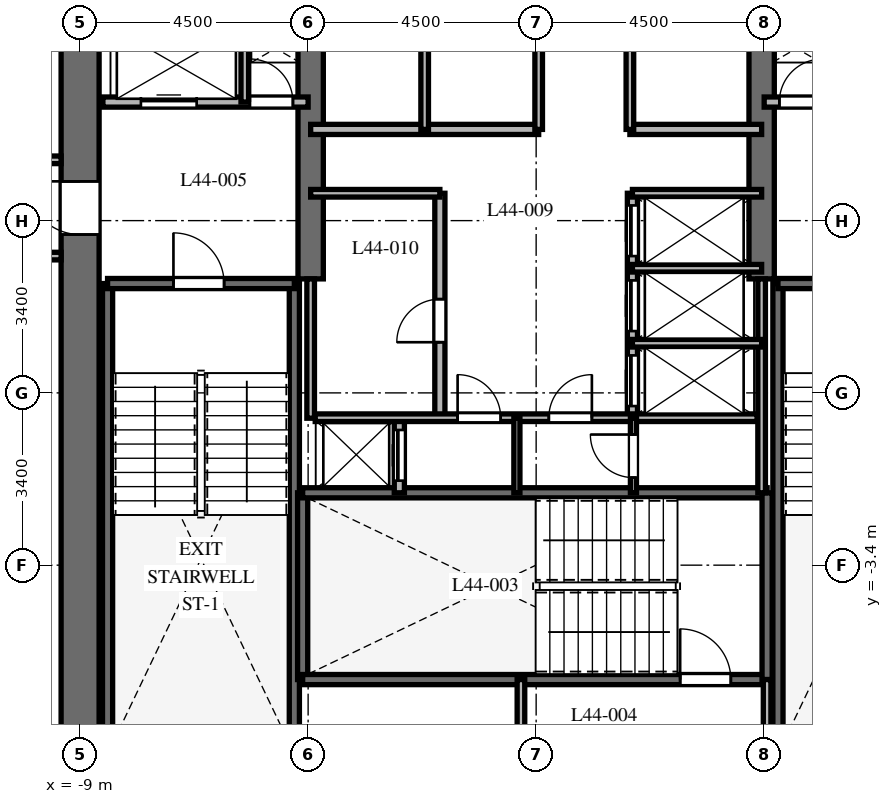
"""IFC4 building model, lengths in metres.
Left out: names, types, materials, properties, quantities, classifications, styles, units other than length and angle.
Written with IfcOpenShell. Run it as: python <this file> out.ifc"""

import sys

from ifc_helpers import new_model, si_unit, direction, frame, frame_2d, origin, place, context, subcontext, project, spatial, rectangle, extrude, element, fill, save


model = new_model("IFC4")
c1 = context("Model", 3, precision=1e-05, world=origin(), true_north=direction((0.0, 1.0)))
c2 = subcontext(c1, "Body", "Model", "MODEL_VIEW")
j1 = project(units=[si_unit("LENGTHUNIT", "METRE"), si_unit("PLANEANGLEUNIT", "RADIAN")], contexts=[c1])
p1 = place(None, origin())
s1 = spatial("IfcSite", under=j1, at=p1, CompositionType="ELEMENT")
p2 = place(p1, origin())
s2 = spatial("IfcBuilding", under=s1, at=p2, CompositionType="ELEMENT")
p3 = place(p2, frame((0.0, 0.0, 179.3)))
s3 = spatial("IfcBuildingStorey", under=s2, at=p3, CompositionType="ELEMENT", Elevation=179.3)
p4 = place(p3, frame((-9.0, -7.125, 0.0), z_axis=(0.0, 0.0, 1.0), x_axis=(0.0, 1.0, 0.0)))
e1 = element("IfcWall", 1, at=p4, inside=s3, PredefinedType="SHEAR", context=c2, shape_type="SweptSolid", body=[
    extrude(rectangle(XDim=14.25, YDim=0.75, at=frame_2d((7.125, 0.0))), origin(), (0.0, 0.0, 1.0), 3.7),
])
p5 = place(p4, frame((10.25, 0.0, 0.0)))
e2 = element("IfcOpeningElement", 2, at=p5, cuts=e1, PredefinedType="OPENING", context=c2, shape_type="SweptSolid", body=[
    extrude(rectangle(XDim=1.05, YDim=2.15, at=frame_2d((0.525, 1.075))), frame((0.0, 0.385, 0.0), z_axis=(0.0, -1.0, 0.0), x_axis=(1.0, 0.0, 0.0)), (0.0, 0.0, 1.0), 0.77),
])
for number, where, z_axis, x_axis in (
    (3, (-4.45, 2.25, 0.0), (0.0, 0.0, 1.0), (0.0, 1.0, 0.0)),
    (4, (4.45, 2.25, 0.0), (0.0, 0.0, 1.0), (0.0, 1.0, 0.0)),
):
    element("IfcWall", number, at=place(p3, frame(where, z_axis=z_axis, x_axis=x_axis)), inside=s3, PredefinedType="SHEAR", context=c2, shape_type="SweptSolid", body=[
        extrude(rectangle(XDim=4.875, YDim=0.5, at=frame_2d((2.438, 0.0))), origin(), (0.0, 0.0, 1.0), 3.7),
    ])
for number, where, z_axis, x_axis in (
    (5, (-8.458, -6.985, 0.0), (0.0, 0.0, 1.0), (0.0, 1.0, 0.0)),
    (6, (-4.772, -6.985, 0.0), (0.0, 0.0, 1.0), (0.0, 1.0, 0.0)),
):
    element("IfcWall", number, at=place(p3, frame(where, z_axis=z_axis, x_axis=x_axis)), inside=s3, PredefinedType="SHEAR", context=c2, shape_type="SweptSolid", body=[
        extrude(rectangle(XDim=9.143, YDim=0.2, at=frame_2d((4.572, 0.0))), origin(), (0.0, 0.0, 1.0), 3.7),
    ])
p6 = place(p3, frame((-8.458, 2.158, 0.0), z_axis=(0.0, 0.0, 1.0), x_axis=(1.0, 0.0, 0.0)))
e7 = element("IfcWall", 7, at=p6, inside=s3, PredefinedType="SHEAR", context=c2, shape_type="SweptSolid", body=[
    extrude(rectangle(XDim=3.686, YDim=0.2, at=frame_2d((1.843, 0.0))), origin(), (0.0, 0.0, 1.0), 3.7),
])
p7 = place(p6, frame((1.3, 0.0, 0.0)))
e8 = element("IfcOpeningElement", 8, at=p7, cuts=e7, PredefinedType="OPENING", context=c2, shape_type="SweptSolid", body=[
    extrude(rectangle(XDim=1.0, YDim=2.15, at=frame_2d((0.5, 1.075))), frame((0.0, 0.11, 0.0), z_axis=(0.0, -1.0, 0.0), x_axis=(1.0, 0.0, 0.0)), (0.0, 0.0, 1.0), 0.22),
])
p8 = place(p3, frame((4.772, -6.985, 0.0), z_axis=(0.0, 0.0, 1.0), x_axis=(0.0, 1.0, 0.0)))
e9 = element("IfcWall", 9, at=p8, inside=s3, PredefinedType="SHEAR", context=c2, shape_type="SweptSolid", body=[
    extrude(rectangle(XDim=9.143, YDim=0.2, at=frame_2d((4.572, 0.0))), origin(), (0.0, 0.0, 1.0), 3.7),
])
p9 = place(p3, frame((4.772, 2.158, 0.0), z_axis=(0.0, 0.0, 1.0), x_axis=(1.0, 0.0, 0.0)))
e10 = element("IfcWall", 10, at=p9, inside=s3, PredefinedType="SHEAR", context=c2, shape_type="SweptSolid", body=[
    extrude(rectangle(XDim=3.686, YDim=0.2, at=frame_2d((1.843, 0.0))), origin(), (0.0, 0.0, 1.0), 3.7),
])
p10 = place(p9, frame((1.35, 0.0, 0.0)))
e11 = element("IfcOpeningElement", 11, at=p10, cuts=e10, PredefinedType="OPENING", context=c2, shape_type="SweptSolid", body=[
    extrude(rectangle(XDim=1.0, YDim=2.15, at=frame_2d((0.5, 1.075))), frame((0.0, 0.11, 0.0), z_axis=(0.0, -1.0, 0.0), x_axis=(1.0, 0.0, 0.0)), (0.0, 0.0, 1.0), 0.22),
])
p11 = place(p3, frame((-4.608, -5.658, 0.0), z_axis=(0.0, 0.0, 1.0), x_axis=(0.0, 1.0, 0.0)))
e12 = element("IfcWall", 12, at=p11, inside=s3, PredefinedType="SHEAR", context=c2, shape_type="SweptSolid", body=[
    extrude(rectangle(XDim=3.686, YDim=0.2, at=frame_2d((1.843, 0.0))), origin(), (0.0, 0.0, 1.0), 3.7),
])
p12 = place(p3, frame((-4.608, -5.658, 0.0), z_axis=(0.0, 0.0, 1.0), x_axis=(1.0, 0.0, 0.0)))
e13 = element("IfcWall", 13, at=p12, inside=s3, PredefinedType="SHEAR", context=c2, shape_type="SweptSolid", body=[
    extrude(rectangle(XDim=9.166, YDim=0.2, at=frame_2d((4.583, 0.0))), origin(), (0.0, 0.0, 1.0), 3.7),
])
p13 = place(p12, frame((7.45, 0.0, 0.0)))
e14 = element("IfcOpeningElement", 14, at=p13, cuts=e13, PredefinedType="OPENING", context=c2, shape_type="SweptSolid", body=[
    extrude(rectangle(XDim=1.0, YDim=2.15, at=frame_2d((0.5, 1.075))), frame((0.0, 0.11, 0.0), z_axis=(0.0, -1.0, 0.0), x_axis=(1.0, 0.0, 0.0)), (0.0, 0.0, 1.0), 0.22),
])
p14 = place(p3, frame((-4.608, -1.972, 0.0), z_axis=(0.0, 0.0, 1.0), x_axis=(1.0, 0.0, 0.0)))
e15 = element("IfcWall", 15, at=p14, inside=s3, PredefinedType="SHEAR", context=c2, shape_type="SweptSolid", body=[
    extrude(rectangle(XDim=9.166, YDim=0.2, at=frame_2d((4.583, 0.0))), origin(), (0.0, 0.0, 1.0), 3.7),
])
p15 = place(p3, frame((4.558, -5.658, 0.0), z_axis=(0.0, 0.0, 1.0), x_axis=(0.0, 1.0, 0.0)))
e16 = element("IfcWall", 16, at=p15, inside=s3, PredefinedType="SHEAR", context=c2, shape_type="SweptSolid", body=[
    extrude(rectangle(XDim=3.686, YDim=0.2, at=frame_2d((1.843, 0.0))), origin(), (0.0, 0.0, 1.0), 3.7),
])
for number, where, z_axis, x_axis in (
    (17, (-0.3, -7.02, 0.0), (0.0, 0.0, 1.0), (0.0, 1.0, 0.0)),
    (18, (4.558, -7.02, 0.0), (0.0, 0.0, 1.0), (0.0, 1.0, 0.0)),
):
    element("IfcWall", number, at=place(p3, frame(where, z_axis=z_axis, x_axis=x_axis)), inside=s3, PredefinedType="PARTITIONING", context=c2, shape_type="SweptSolid", body=[
        extrude(rectangle(XDim=1.362, YDim=0.15, at=frame_2d((0.681, 0.0))), origin(), (0.0, 0.0, 1.0), 3.4),
    ])
p16 = place(p3, frame((-8.55, 5.74, 0.0), z_axis=(0.0, 0.0, 1.0), x_axis=(1.0, 0.0, 0.0)))
e19 = element("IfcWall", 19, at=p16, inside=s3, PredefinedType="PARTITIONING", context=c2, shape_type="SweptSolid", body=[
    extrude(rectangle(XDim=4.05, YDim=0.2, at=frame_2d((2.025, 0.0))), origin(), (0.0, 0.0, 1.0), 3.4),
])
p17 = place(p16, frame((0.75, 0.0, 0.0)))
e20 = element("IfcOpeningElement", 20, at=p17, cuts=e19, PredefinedType="OPENING", context=c2, shape_type="SweptSolid", body=[
    extrude(rectangle(XDim=1.1, YDim=2.2, at=frame_2d((0.55, 1.1))), frame((0.0, 0.11, 0.0), z_axis=(0.0, -1.0, 0.0), x_axis=(1.0, 0.0, 0.0)), (0.0, 0.0, 1.0), 0.22),
])
p18 = place(p16, frame((2.9, 0.0, 0.0)))
e21 = element("IfcOpeningElement", 21, at=p18, cuts=e19, PredefinedType="OPENING", context=c2, shape_type="SweptSolid", body=[
    extrude(rectangle(XDim=0.85, YDim=2.03, at=frame_2d((0.425, 1.015))), frame((0.0, 0.11, 0.0), z_axis=(0.0, -1.0, 0.0), x_axis=(1.0, 0.0, 0.0)), (0.0, 0.0, 1.0), 0.22),
])
p19 = place(p3, frame((-5.75, 5.74, 0.0), z_axis=(0.0, 0.0, 1.0), x_axis=(0.0, 1.0, 0.0)))
e22 = element("IfcWall", 22, at=p19, inside=s3, PredefinedType="PARTITIONING", context=c2, shape_type="SweptSolid", body=[
    extrude(rectangle(XDim=1.41, YDim=0.15, at=frame_2d((0.705, 0.0))), origin(), (0.0, 0.0, 1.0), 3.4),
])
p20 = place(p3, frame((4.5, 5.74, 0.0), z_axis=(0.0, 0.0, 1.0), x_axis=(1.0, 0.0, 0.0)))
e23 = element("IfcWall", 23, at=p20, inside=s3, PredefinedType="PARTITIONING", context=c2, shape_type="SweptSolid", body=[
    extrude(rectangle(XDim=4.05, YDim=0.2, at=frame_2d((2.025, 0.0))), origin(), (0.0, 0.0, 1.0), 3.4),
])
p21 = place(p20, frame((0.3, 0.0, 0.0)))
e24 = element("IfcOpeningElement", 24, at=p21, cuts=e23, PredefinedType="OPENING", context=c2, shape_type="SweptSolid", body=[
    extrude(rectangle(XDim=0.85, YDim=2.03, at=frame_2d((0.425, 1.015))), frame((0.0, 0.11, 0.0), z_axis=(0.0, -1.0, 0.0), x_axis=(1.0, 0.0, 0.0)), (0.0, 0.0, 1.0), 0.22),
])
p22 = place(p20, frame((2.15, 0.0, 0.0)))
e25 = element("IfcOpeningElement", 25, at=p22, cuts=e23, PredefinedType="OPENING", context=c2, shape_type="SweptSolid", body=[
    extrude(rectangle(XDim=1.1, YDim=2.2, at=frame_2d((0.55, 1.1))), frame((0.0, 0.11, 0.0), z_axis=(0.0, -1.0, 0.0), x_axis=(1.0, 0.0, 0.0)), (0.0, 0.0, 1.0), 0.22),
])
p23 = place(p3, frame((-2.7, -1.972, 0.0), z_axis=(0.0, 0.0, 1.0), x_axis=(0.0, 1.0, 0.0)))
e26 = element("IfcWall", 26, at=p23, inside=s3, PredefinedType="PARTITIONING", context=c2, shape_type="SweptSolid", body=[
    extrude(rectangle(XDim=1.472, YDim=0.2, at=frame_2d((0.736, 0.0))), origin(), (0.0, 0.0, 1.0), 3.4),
])
p24 = place(p23, frame((0.24, 0.0, 0.0)))
e27 = element("IfcOpeningElement", 27, at=p24, cuts=e26, PredefinedType="OPENING", context=c2, shape_type="SweptSolid", body=[
    extrude(rectangle(XDim=1.0, YDim=2.2, at=frame_2d((0.5, 1.1))), frame((0.0, 0.11, 0.0), z_axis=(0.0, -1.0, 0.0), x_axis=(1.0, 0.0, 0.0)), (0.0, 0.0, 1.0), 0.22),
])
p25 = place(p3, frame((-4.45, 5.2, 0.0), z_axis=(0.0, 0.0, 1.0), x_axis=(1.0, 0.0, 0.0)))
e28 = element("IfcWall", 28, at=p25, inside=s3, PredefinedType="PARTITIONING", context=c2, shape_type="SweptSolid", body=[
    extrude(rectangle(XDim=4.5, YDim=0.2, at=frame_2d((2.25, 0.0))), origin(), (0.0, 0.0, 1.0), 3.4),
])
p26 = place(p3, frame((1.85, 5.2, 0.0), z_axis=(0.0, 0.0, 1.0), x_axis=(1.0, 0.0, 0.0)))
e29 = element("IfcWall", 29, at=p26, inside=s3, PredefinedType="PARTITIONING", context=c2, shape_type="SweptSolid", body=[
    extrude(rectangle(XDim=2.6, YDim=0.2, at=frame_2d((1.3, 0.0))), origin(), (0.0, 0.0, 1.0), 3.4),
])
p27 = place(p3, frame((-2.2, 5.2, 0.0), z_axis=(0.0, 0.0, 1.0), x_axis=(0.0, 1.0, 0.0)))
e30 = element("IfcWall", 30, at=p27, inside=s3, PredefinedType="PARTITIONING", context=c2, shape_type="SweptSolid", body=[
    extrude(rectangle(XDim=1.85, YDim=0.15, at=frame_2d((0.925, 0.0))), origin(), (0.0, 0.0, 1.0), 3.4),
])
for number, where, z_axis, x_axis in (
    (31, (0.05, 5.2, 0.0), (0.0, 0.0, 1.0), (0.0, 1.0, 0.0)),
    (32, (1.85, 5.2, 0.0), (0.0, 0.0, 1.0), (0.0, 1.0, 0.0)),
):
    element("IfcWall", number, at=place(p3, frame(where, z_axis=z_axis, x_axis=x_axis)), inside=s3, PredefinedType="PARTITIONING", context=c2, shape_type="SweptSolid", body=[
        extrude(rectangle(XDim=1.95, YDim=0.15, at=frame_2d((0.975, 0.0))), origin(), (0.0, 0.0, 1.0), 3.4),
    ])
p28 = place(p3, frame((-4.45, -0.5, 0.0), z_axis=(0.0, 0.0, 1.0), x_axis=(0.0, 1.0, 0.0)))
e33 = element("IfcWall", 33, at=p28, inside=s3, PredefinedType="PARTITIONING", context=c2, shape_type="SweptSolid", body=[
    extrude(rectangle(XDim=2.75, YDim=0.15, at=frame_2d((1.375, 0.0))), origin(), (0.0, 0.0, 1.0), 3.4),
])
p29 = place(p3, frame((4.45, -1.972, 0.0), z_axis=(0.0, 0.0, 1.0), x_axis=(0.0, 1.0, 0.0)))
e34 = element("IfcWall", 34, at=p29, inside=s3, PredefinedType="PARTITIONING", context=c2, shape_type="SweptSolid", body=[
    extrude(rectangle(XDim=4.222, YDim=0.15, at=frame_2d((2.111, 0.0))), origin(), (0.0, 0.0, 1.0), 3.4),
])
p30 = place(p3, frame((-1.9, -0.5, 0.0), z_axis=(0.0, 0.0, 1.0), x_axis=(0.0, 1.0, 0.0)))
e35 = element("IfcWall", 35, at=p30, inside=s3, PredefinedType="PARTITIONING", context=c2, shape_type="SweptSolid", body=[
    extrude(rectangle(XDim=4.44, YDim=0.2, at=frame_2d((2.22, 0.0))), origin(), (0.0, 0.0, 1.0), 3.4),
])
p31 = place(p30, frame((1.5, 0.0, 0.0)))
e36 = element("IfcOpeningElement", 36, at=p31, cuts=e35, PredefinedType="OPENING", context=c2, shape_type="SweptSolid", body=[
    extrude(rectangle(XDim=0.85, YDim=2.03, at=frame_2d((0.425, 1.015))), frame((0.0, 0.11, 0.0), z_axis=(0.0, -1.0, 0.0), x_axis=(1.0, 0.0, 0.0)), (0.0, 0.0, 1.0), 0.22),
])
p32 = place(p3, frame((-4.45, 3.94, 0.0), z_axis=(0.0, 0.0, 1.0), x_axis=(1.0, 0.0, 0.0)))
e37 = element("IfcWall", 37, at=p32, inside=s3, PredefinedType="PARTITIONING", context=c2, shape_type="SweptSolid", body=[
    extrude(rectangle(XDim=2.55, YDim=0.15, at=frame_2d((1.275, 0.0))), origin(), (0.0, 0.0, 1.0), 3.4),
])
p33 = place(p3, frame((1.9, -0.5, 0.0), z_axis=(0.0, 0.0, 1.0), x_axis=(0.0, 1.0, 0.0)))
e38 = element("IfcWall", 38, at=p33, inside=s3, PredefinedType="PARTITIONING", context=c2, shape_type="SweptSolid", body=[
    extrude(rectangle(XDim=4.44, YDim=0.2, at=frame_2d((2.22, 0.0))), origin(), (0.0, 0.0, 1.0), 3.4),
])
p34 = place(p33, frame((0.24, 0.0, 0.0)))
e39 = element("IfcOpeningElement", 39, at=p34, cuts=e38, PredefinedType="OPENING", context=c2, shape_type="SweptSolid", body=[
    extrude(rectangle(XDim=1.0, YDim=2.2, at=frame_2d((0.5, 1.1))), frame((0.0, 0.11, 0.0), z_axis=(0.0, -1.0, 0.0), x_axis=(1.0, 0.0, 0.0)), (0.0, 0.0, 1.0), 0.22),
])
p35 = place(p33, frame((1.72, 0.0, 0.0)))
e40 = element("IfcOpeningElement", 40, at=p35, cuts=e38, PredefinedType="OPENING", context=c2, shape_type="SweptSolid", body=[
    extrude(rectangle(XDim=1.0, YDim=2.2, at=frame_2d((0.5, 1.1))), frame((0.0, 0.11, 0.0), z_axis=(0.0, -1.0, 0.0), x_axis=(1.0, 0.0, 0.0)), (0.0, 0.0, 1.0), 0.22),
])
p36 = place(p33, frame((3.2, 0.0, 0.0)))
e41 = element("IfcOpeningElement", 41, at=p36, cuts=e38, PredefinedType="OPENING", context=c2, shape_type="SweptSolid", body=[
    extrude(rectangle(XDim=1.0, YDim=2.2, at=frame_2d((0.5, 1.1))), frame((0.0, 0.11, 0.0), z_axis=(0.0, -1.0, 0.0), x_axis=(1.0, 0.0, 0.0)), (0.0, 0.0, 1.0), 0.22),
])
for number, where, z_axis, x_axis in (
    (42, (1.9, 3.94, 0.0), (0.0, 0.0, 1.0), (1.0, 0.0, 0.0)),
    (43, (1.9, 0.98, 0.0), (0.0, 0.0, 1.0), (1.0, 0.0, 0.0)),
    (44, (1.9, 2.46, 0.0), (0.0, 0.0, 1.0), (1.0, 0.0, 0.0)),
):
    element("IfcWall", number, at=place(p3, frame(where, z_axis=z_axis, x_axis=x_axis)), inside=s3, PredefinedType="PARTITIONING", context=c2, shape_type="SweptSolid", body=[
        extrude(rectangle(XDim=2.55, YDim=0.15, at=frame_2d((1.275, 0.0))), origin(), (0.0, 0.0, 1.0), 3.4),
    ])
p37 = place(p3, frame((-4.36, -0.49, 0.0), z_axis=(0.0, 0.0, 1.0), x_axis=(1.0, 0.0, 0.0)))
e45 = element("IfcWall", 45, at=p37, inside=s3, PredefinedType="PARTITIONING", context=c2, shape_type="SweptSolid", body=[
    extrude(rectangle(XDim=8.72, YDim=0.15, at=frame_2d((4.36, 0.0))), origin(), (0.0, 0.0, 1.0), 3.4),
])
p38 = place(p37, frame((2.81, 0.0, 0.0)))
e46 = element("IfcOpeningElement", 46, at=p38, cuts=e45, PredefinedType="OPENING", context=c2, shape_type="SweptSolid", body=[
    extrude(rectangle(XDim=0.85, YDim=2.03, at=frame_2d((0.425, 1.015))), frame((0.0, 0.085, 0.0), z_axis=(0.0, -1.0, 0.0), x_axis=(1.0, 0.0, 0.0)), (0.0, 0.0, 1.0), 0.17),
])
p39 = place(p37, frame((4.61, 0.0, 0.0)))
e47 = element("IfcOpeningElement", 47, at=p39, cuts=e45, PredefinedType="OPENING", context=c2, shape_type="SweptSolid", body=[
    extrude(rectangle(XDim=0.85, YDim=2.03, at=frame_2d((0.425, 1.015))), frame((0.0, 0.085, 0.0), z_axis=(0.0, -1.0, 0.0), x_axis=(1.0, 0.0, 0.0)), (0.0, 0.0, 1.0), 0.17),
])
p40 = place(p3, frame((-0.38, -1.972, 0.0), z_axis=(0.0, 0.0, 1.0), x_axis=(0.0, 1.0, 0.0)))
e48 = element("IfcWall", 48, at=p40, inside=s3, PredefinedType="PARTITIONING", context=c2, shape_type="SweptSolid", body=[
    extrude(rectangle(XDim=1.472, YDim=0.12, at=frame_2d((0.736, 0.0))), origin(), (0.0, 0.0, 1.0), 3.4),
])
p41 = place(p3, frame((1.92, -1.972, 0.0), z_axis=(0.0, 0.0, 1.0), x_axis=(0.0, 1.0, 0.0)))
e49 = element("IfcWall", 49, at=p41, inside=s3, PredefinedType="PARTITIONING", context=c2, shape_type="SweptSolid", body=[
    extrude(rectangle(XDim=1.472, YDim=0.12, at=frame_2d((0.736, 0.0))), origin(), (0.0, 0.0, 1.0), 3.4),
])
p42 = place(p41, frame((0.3, 0.0, 0.0)))
e50 = element("IfcOpeningElement", 50, at=p42, cuts=e49, PredefinedType="OPENING", context=c2, shape_type="SweptSolid", body=[
    extrude(rectangle(XDim=0.85, YDim=2.03, at=frame_2d((0.425, 1.015))), frame((0.0, 0.07, 0.0), z_axis=(0.0, -1.0, 0.0), x_axis=(1.0, 0.0, 0.0)), (0.0, 0.0, 1.0), 0.14),
])
p43 = place(p3, frame((-11.55, 4.6, 0.0), z_axis=(0.0, 0.0, 1.0), x_axis=(1.0, 0.0, 0.0)))
e51 = element("IfcWall", 51, at=p43, inside=s3, PredefinedType="PARTITIONING", context=c2, shape_type="SweptSolid", body=[
    extrude(rectangle(XDim=2.175, YDim=0.15, at=frame_2d((1.087, 0.0))), origin(), (0.0, 0.0, 1.0), 3.4),
])
p44 = place(p3, frame((-9.375, 2.7, 0.0), z_axis=(0.0, 0.0, 1.0), x_axis=(-1.0, 0.0, 0.0)))
e52 = element("IfcWall", 52, at=p44, inside=s3, PredefinedType="PARTITIONING", context=c2, shape_type="SweptSolid", body=[
    extrude(rectangle(XDim=2.175, YDim=0.15, at=frame_2d((1.087, 0.0))), origin(), (0.0, 0.0, 1.0), 3.4),
])
p45 = place(p44, frame((0.663, 0.0, 0.0)))
e53 = element("IfcOpeningElement", 53, at=p45, cuts=e52, PredefinedType="OPENING", context=c2, shape_type="SweptSolid", body=[
    extrude(rectangle(XDim=0.85, YDim=2.03, at=frame_2d((0.425, 1.015))), frame((0.0, 0.085, 0.0), z_axis=(0.0, -1.0, 0.0), x_axis=(1.0, 0.0, 0.0)), (0.0, 0.0, 1.0), 0.17),
])
p46 = place(p7, origin())
e54 = element("IfcDoor", 54, at=p46, inside=s3, OperationType="SINGLE_SWING_LEFT", PredefinedType="DOOR", context=c2, shape_type="SweptSolid", body=[
    extrude(rectangle(XDim=1.0, YDim=2.15, at=frame_2d((0.5, 1.075))), frame((0.0, 0.025, 0.0), z_axis=(0.0, -1.0, 0.0), x_axis=(1.0, 0.0, 0.0)), (0.0, 0.0, 1.0), 0.05),
])
fill(e8, e54)
p47 = place(p13, origin())
e55 = element("IfcDoor", 55, at=p47, inside=s3, OperationType="SINGLE_SWING_LEFT", PredefinedType="DOOR", context=c2, shape_type="SweptSolid", body=[
    extrude(rectangle(XDim=1.0, YDim=2.15, at=frame_2d((0.5, 1.075))), frame((0.0, 0.025, 0.0), z_axis=(0.0, -1.0, 0.0), x_axis=(1.0, 0.0, 0.0)), (0.0, 0.0, 1.0), 0.05),
])
fill(e14, e55)
p48 = place(p5, origin())
e56 = element("IfcDoor", 56, at=p48, inside=s3, OperationType="SINGLE_SWING_RIGHT", PredefinedType="DOOR", context=c2, shape_type="SweptSolid", body=[
    extrude(rectangle(XDim=1.05, YDim=2.15, at=frame_2d((0.525, 1.075))), frame((0.0, 0.025, 0.0), z_axis=(0.0, -1.0, 0.0), x_axis=(1.0, 0.0, 0.0)), (0.0, 0.0, 1.0), 0.05),
])
fill(e2, e56)
p49 = place(p17, origin())
e57 = element("IfcDoor", 57, at=p49, inside=s3, OperationType="SLIDING_TO_LEFT", PredefinedType="DOOR", context=c2, shape_type="SweptSolid", body=[
    extrude(rectangle(XDim=1.1, YDim=2.2, at=frame_2d((0.55, 1.1))), frame((0.0, 0.025, 0.0), z_axis=(0.0, -1.0, 0.0), x_axis=(1.0, 0.0, 0.0)), (0.0, 0.0, 1.0), 0.05),
])
fill(e20, e57)
p50 = place(p18, origin())
e58 = element("IfcDoor", 58, at=p50, inside=s3, OperationType="SINGLE_SWING_LEFT", PredefinedType="DOOR", context=c2, shape_type="SweptSolid", body=[
    extrude(rectangle(XDim=0.85, YDim=2.03, at=frame_2d((0.425, 1.015))), frame((0.0, 0.025, 0.0), z_axis=(0.0, -1.0, 0.0), x_axis=(1.0, 0.0, 0.0)), (0.0, 0.0, 1.0), 0.05),
])
fill(e21, e58)
p51 = place(p21, origin())
e59 = element("IfcDoor", 59, at=p51, inside=s3, OperationType="SINGLE_SWING_RIGHT", PredefinedType="DOOR", context=c2, shape_type="SweptSolid", body=[
    extrude(rectangle(XDim=0.85, YDim=2.03, at=frame_2d((0.425, 1.015))), frame((0.0, 0.025, 0.0), z_axis=(0.0, -1.0, 0.0), x_axis=(1.0, 0.0, 0.0)), (0.0, 0.0, 1.0), 0.05),
])
fill(e24, e59)
p52 = place(p24, origin())
e60 = element("IfcDoor", 60, at=p52, inside=s3, OperationType="SLIDING_TO_LEFT", PredefinedType="DOOR", context=c2, shape_type="SweptSolid", body=[
    extrude(rectangle(XDim=1.0, YDim=2.2, at=frame_2d((0.5, 1.1))), frame((0.0, 0.025, 0.0), z_axis=(0.0, -1.0, 0.0), x_axis=(1.0, 0.0, 0.0)), (0.0, 0.0, 1.0), 0.05),
])
fill(e27, e60)
p53 = place(p31, origin())
e61 = element("IfcDoor", 61, at=p53, inside=s3, OperationType="SINGLE_SWING_LEFT", PredefinedType="DOOR", context=c2, shape_type="SweptSolid", body=[
    extrude(rectangle(XDim=0.85, YDim=2.03, at=frame_2d((0.425, 1.015))), frame((0.0, 0.025, 0.0), z_axis=(0.0, -1.0, 0.0), x_axis=(1.0, 0.0, 0.0)), (0.0, 0.0, 1.0), 0.05),
])
fill(e36, e61)
p54 = place(p34, origin())
e62 = element("IfcDoor", 62, at=p54, inside=s3, OperationType="SLIDING_TO_RIGHT", PredefinedType="DOOR", context=c2, shape_type="SweptSolid", body=[
    extrude(rectangle(XDim=1.0, YDim=2.2, at=frame_2d((0.5, 1.1))), frame((0.0, 0.025, 0.0), z_axis=(0.0, -1.0, 0.0), x_axis=(1.0, 0.0, 0.0)), (0.0, 0.0, 1.0), 0.05),
])
fill(e39, e62)
p55 = place(p35, origin())
e63 = element("IfcDoor", 63, at=p55, inside=s3, OperationType="SLIDING_TO_RIGHT", PredefinedType="DOOR", context=c2, shape_type="SweptSolid", body=[
    extrude(rectangle(XDim=1.0, YDim=2.2, at=frame_2d((0.5, 1.1))), frame((0.0, 0.025, 0.0), z_axis=(0.0, -1.0, 0.0), x_axis=(1.0, 0.0, 0.0)), (0.0, 0.0, 1.0), 0.05),
])
fill(e40, e63)
p56 = place(p36, origin())
e64 = element("IfcDoor", 64, at=p56, inside=s3, OperationType="SLIDING_TO_RIGHT", PredefinedType="DOOR", context=c2, shape_type="SweptSolid", body=[
    extrude(rectangle(XDim=1.0, YDim=2.2, at=frame_2d((0.5, 1.1))), frame((0.0, 0.025, 0.0), z_axis=(0.0, -1.0, 0.0), x_axis=(1.0, 0.0, 0.0)), (0.0, 0.0, 1.0), 0.05),
])
fill(e41, e64)
p57 = place(p38, origin())
e65 = element("IfcDoor", 65, at=p57, inside=s3, OperationType="SINGLE_SWING_LEFT", PredefinedType="DOOR", context=c2, shape_type="SweptSolid", body=[
    extrude(rectangle(XDim=0.85, YDim=2.03, at=frame_2d((0.425, 1.015))), frame((0.0, 0.025, 0.0), z_axis=(0.0, -1.0, 0.0), x_axis=(1.0, 0.0, 0.0)), (0.0, 0.0, 1.0), 0.05),
])
fill(e46, e65)
p58 = place(p39, origin())
e66 = element("IfcDoor", 66, at=p58, inside=s3, OperationType="SINGLE_SWING_RIGHT", PredefinedType="DOOR", context=c2, shape_type="SweptSolid", body=[
    extrude(rectangle(XDim=0.85, YDim=2.03, at=frame_2d((0.425, 1.015))), frame((0.0, 0.025, 0.0), z_axis=(0.0, -1.0, 0.0), x_axis=(1.0, 0.0, 0.0)), (0.0, 0.0, 1.0), 0.05),
])
fill(e47, e66)
p59 = place(p42, origin())
e67 = element("IfcDoor", 67, at=p59, inside=s3, OperationType="SINGLE_SWING_RIGHT", PredefinedType="DOOR", context=c2, shape_type="SweptSolid", body=[
    extrude(rectangle(XDim=0.85, YDim=2.03, at=frame_2d((0.425, 1.015))), frame((0.0, 0.025, 0.0), z_axis=(0.0, -1.0, 0.0), x_axis=(1.0, 0.0, 0.0)), (0.0, 0.0, 1.0), 0.05),
])
fill(e50, e67)
save(model, sys.argv[1])
